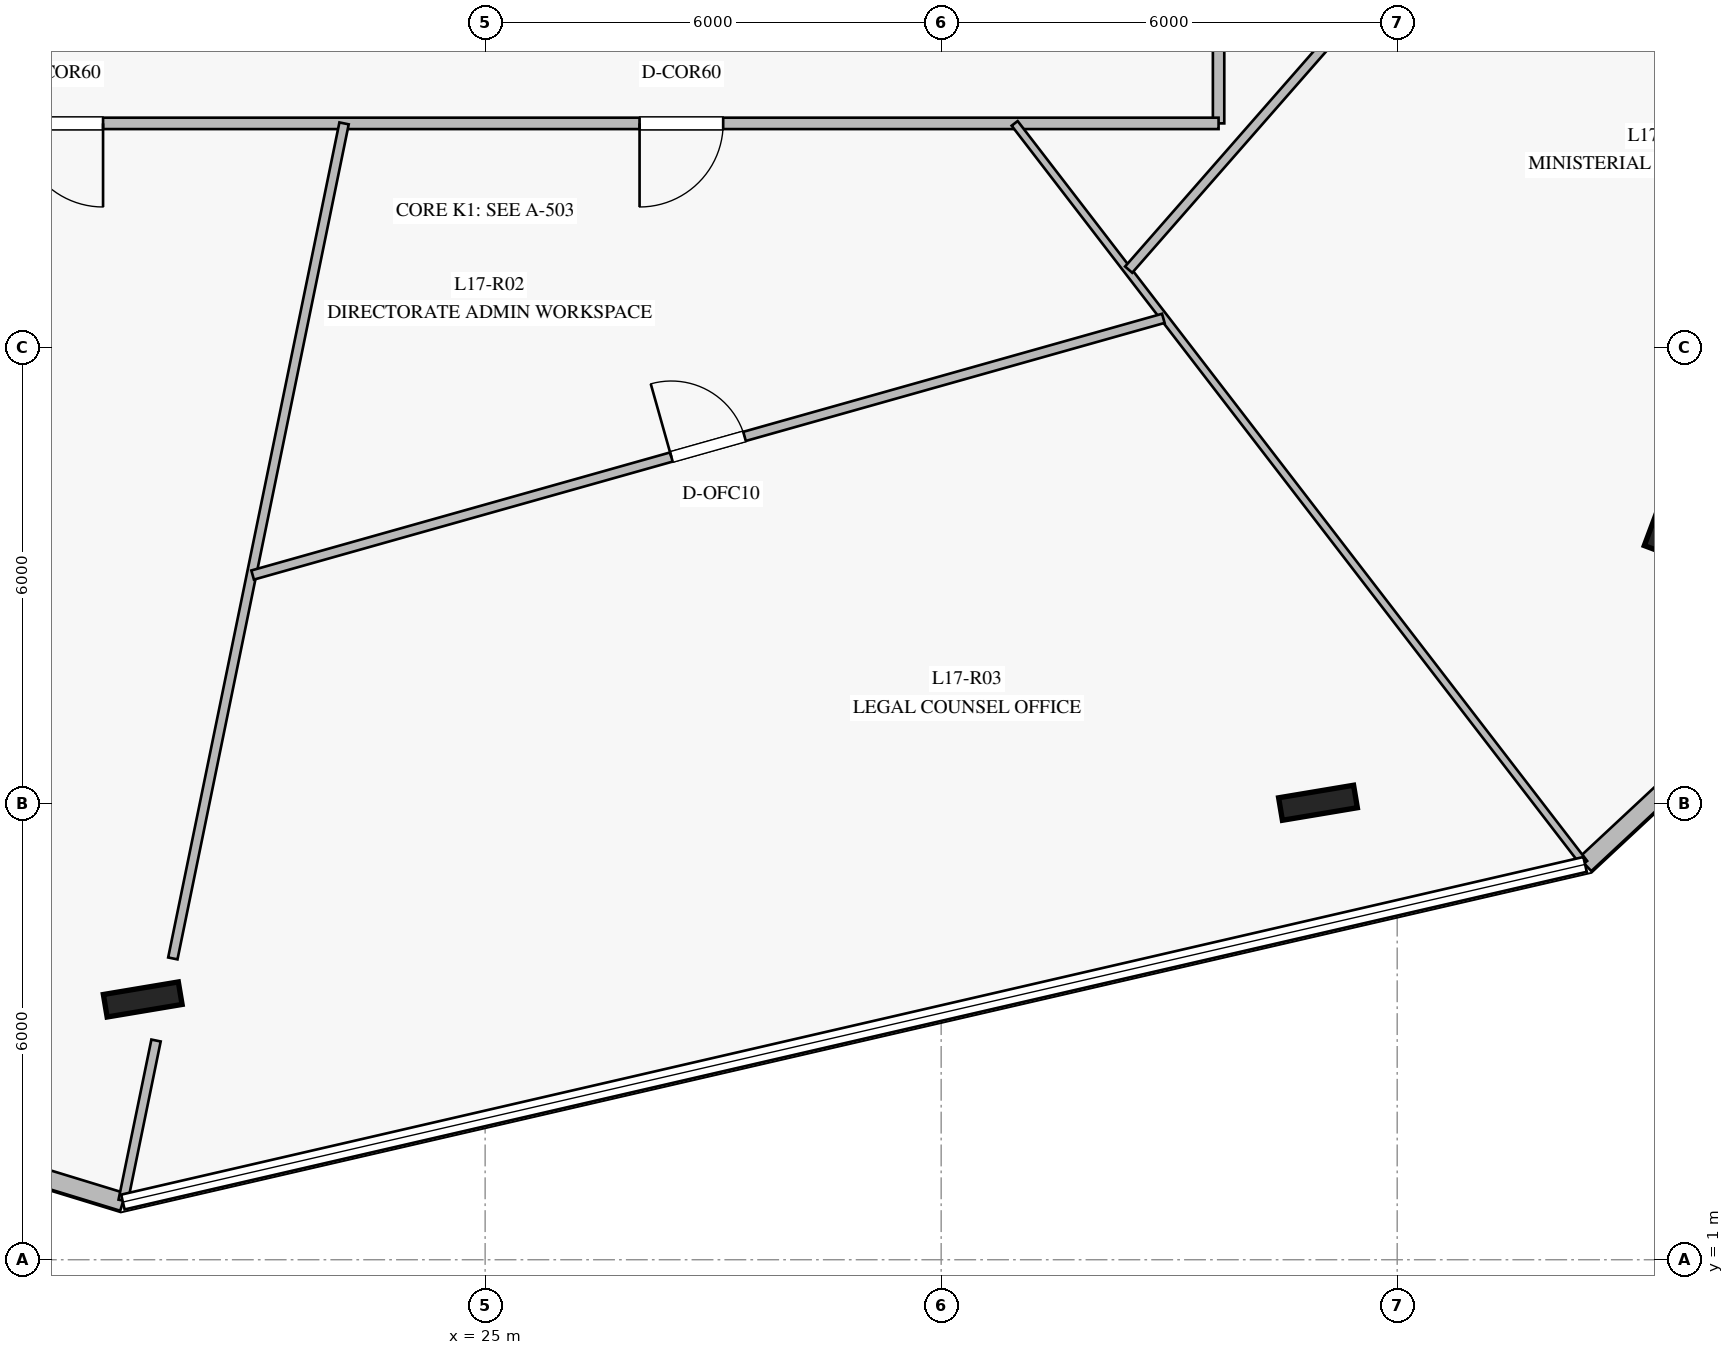
"""IFC4 building model, lengths in metres.
Left out: names, types, materials, properties, quantities, classifications, styles, units other than length and angle.
Written with IfcOpenShell. Run it as: python <this file> out.ifc"""

import sys

from ifc_helpers import new_model, si_unit, direction, frame, frame_2d, origin, origin_2d, place, context, subcontext, project, spatial, rectangle, i_section, extrude, element, fill, save


model = new_model("IFC4")
c1 = context("Model", 3, precision=1e-05, world=origin(), true_north=direction((0.0, 1.0)))
c2 = subcontext(c1, "Body", "Model", "MODEL_VIEW")
j1 = project(units=[si_unit("LENGTHUNIT", "METRE"), si_unit("PLANEANGLEUNIT", "RADIAN")], contexts=[c1])
p1 = place(None, origin())
s1 = spatial("IfcSite", under=j1, at=p1, CompositionType="ELEMENT")
p2 = place(p1, origin())
s2 = spatial("IfcBuilding", under=s1, at=p2, CompositionType="ELEMENT")
p3 = place(p2, frame((0.0, 0.0, 72.0)))
s3 = spatial("IfcBuildingStorey", under=s2, at=p3, CompositionType="ELEMENT", Elevation=72.0)
for number, where, z_axis, x_axis in (
    (1, (20.495, 4.424, 0.0), (0.0, 0.0, 1.0), (0.986, 0.165, 0.0)),
    (2, (35.958, 7.012, 0.0), (0.0, 0.0, 1.0), (0.986, 0.165, 0.0)),
    (3, (40.567, 10.811, 0.0), (0.0, 0.0, 1.0), (0.35, 0.937, 0.0)),
):
    element("IfcColumn", number, at=place(p3, frame(where, z_axis=z_axis, x_axis=x_axis)), inside=s3, PredefinedType="COLUMN", context=c2, shape_type="SweptSolid", body=[
        extrude(i_section(OverallWidth=0.3, OverallDepth=1.0, WebThickness=0.019, FlangeThickness=0.036, at=origin_2d()), origin(), (0.0, 0.0, 1.0), 4.0),
    ])
p4 = place(p3, frame((15.955, 3.067, 0.0), z_axis=(0.0, 0.0, 1.0), x_axis=(0.956323609786, -0.292310029535, 0.0)))
e4 = element("IfcWall", 4, at=p4, inside=s3, PredefinedType="STANDARD", context=c2, shape_type="SweptSolid", body=[
    extrude(rectangle(XDim=4.474, YDim=0.24, at=frame_2d((2.237, 0.0))), origin(), (0.0, 0.0, 1.0), 3.76),
])
p5 = place(p3, frame((39.472, 6.201, 0.0), z_axis=(0.0, 0.0, 1.0), x_axis=(0.731267590606, 0.682090691133, 0.0)))
e5 = element("IfcWall", 5, at=p5, inside=s3, PredefinedType="STANDARD", context=c2, shape_type="SweptSolid", body=[
    extrude(rectangle(XDim=4.473, YDim=0.24, at=frame_2d((2.237, 0.0))), origin(), (0.0, 0.0, 1.0), 3.76),
])
p6 = place(p3, frame((34.65, 34.05, 0.0), z_axis=(0.0, 0.0, 1.0), x_axis=(0.0, -1.0, 0.0)))
e6 = element("IfcWall", 6, at=p6, inside=s3, PredefinedType="PARTITIONING", context=c2, shape_type="SweptSolid", body=[
    extrude(rectangle(XDim=18.1, YDim=0.15, at=frame_2d((9.05, 0.0))), origin(), (0.0, 0.0, 1.0), 3.21),
])
p7 = place(p6, frame((13.102, 0.0, 0.0)))
e7 = element("IfcOpeningElement", 7, at=p7, cuts=e6, PredefinedType="OPENING", context=c2, shape_type="SweptSolid", body=[
    extrude(rectangle(XDim=1.1, YDim=2.2, at=frame_2d((0.55, 1.1))), frame((0.0, 0.085, 0.0), z_axis=(0.0, -1.0, 0.0), x_axis=(1.0, 0.0, 0.0)), (0.0, 0.0, 1.0), 0.17),
])
p8 = place(p3, frame((34.65, 15.95, 0.0), z_axis=(0.0, 0.0, 1.0), x_axis=(-1.0, 0.0, 0.0)))
e8 = element("IfcWall", 8, at=p8, inside=s3, PredefinedType="PARTITIONING", context=c2, shape_type="SweptSolid", body=[
    extrude(rectangle(XDim=19.3, YDim=0.15, at=frame_2d((9.65, 0.0))), origin(), (0.0, 0.0, 1.0), 3.21),
])
p9 = place(p8, frame((14.677, 0.0, 0.0)))
e9 = element("IfcOpeningElement", 9, at=p9, cuts=e8, PredefinedType="OPENING", context=c2, shape_type="SweptSolid", body=[
    extrude(rectangle(XDim=1.1, YDim=2.2, at=frame_2d((0.55, 1.1))), frame((0.0, 0.085, 0.0), z_axis=(0.0, -1.0, 0.0), x_axis=(1.0, 0.0, 0.0)), (0.0, 0.0, 1.0), 0.17),
])
p10 = place(p8, frame((6.518, 0.0, 0.0)))
e10 = element("IfcOpeningElement", 10, at=p10, cuts=e8, PredefinedType="OPENING", context=c2, shape_type="SweptSolid", body=[
    extrude(rectangle(XDim=1.1, YDim=2.2, at=frame_2d((0.55, 1.1))), frame((0.0, 0.085, 0.0), z_axis=(0.0, -1.0, 0.0), x_axis=(1.0, 0.0, 0.0)), (0.0, 0.0, 1.0), 0.17),
])
p11 = place(p3, frame((23.144, 15.95, 0.0), z_axis=(0.0, 0.0, 1.0), x_axis=(-0.200894861911, -0.979612808439, 0.0)))
e11 = element("IfcWall", 11, at=p11, inside=s3, PredefinedType="PARTITIONING", context=c2, shape_type="SweptSolid", body=[
    extrude(rectangle(XDim=11.214, YDim=0.125, at=frame_2d((5.607, 0.0))), origin(), (0.0, 0.0, 1.0), 3.76),
])
p12 = place(p3, frame((20.67, 3.884, 0.0), z_axis=(0.0, 0.0, 1.0), x_axis=(-0.200896639603, -0.979612443876, 0.0)))
e12 = element("IfcWall", 12, at=p12, inside=s3, PredefinedType="PARTITIONING", context=c2, shape_type="SweptSolid", body=[
    extrude(rectangle(XDim=2.15, YDim=0.125, at=frame_2d((1.075, 0.0))), origin(), (0.0, 0.0, 1.0), 3.76),
])
p13 = place(p3, frame((31.967, 15.95, 0.0), z_axis=(0.0, 0.0, 1.0), x_axis=(0.609982546542, -0.792414848999, 0.0)))
e13 = element("IfcWall", 13, at=p13, inside=s3, PredefinedType="MOVABLE", context=c2, shape_type="SweptSolid", body=[
    extrude(rectangle(XDim=12.284, YDim=0.1, at=frame_2d((6.142, 0.0))), origin(), (0.0, 0.0, 1.0), 3.06),
])
p14 = place(p3, frame((21.941, 10.008, 0.0), z_axis=(0.0, 0.0, 1.0), x_axis=(0.962504966676, 0.271264057928, 0.0)))
e14 = element("IfcWall", 14, at=p14, inside=s3, PredefinedType="PARTITIONING", context=c2, shape_type="SweptSolid", body=[
    extrude(rectangle(XDim=12.449, YDim=0.125, at=frame_2d((6.225, 0.0))), origin(), (0.0, 0.0, 1.0), 3.21),
])
p15 = place(p14, frame((5.724, 0.0, 0.0)))
e15 = element("IfcOpeningElement", 15, at=p15, cuts=e14, PredefinedType="OPENING", context=c2, shape_type="SweptSolid", body=[
    extrude(rectangle(XDim=1.0, YDim=2.15, at=frame_2d((0.5, 1.075))), frame((0.0, 0.073, 0.0), z_axis=(0.0, -1.0, 0.0), x_axis=(1.0, 0.0, 0.0)), (0.0, 0.0, 1.0), 0.145),
])
p16 = place(p3, frame((33.467, 14.026, 0.0), z_axis=(0.0, 0.0, 1.0), x_axis=(0.65898913026, 0.752152462071, 0.0)))
e16 = element("IfcWall", 16, at=p16, inside=s3, PredefinedType="PARTITIONING", context=c2, shape_type="SweptSolid", body=[
    extrude(rectangle(XDim=12.946, YDim=0.125, at=frame_2d((6.473, 0.0))), origin(), (0.0, 0.0, 1.0), 3.05),
])
p17 = place(p16, frame((5.883, 0.0, 0.0)))
e17 = element("IfcOpeningElement", 17, at=p17, cuts=e16, PredefinedType="OPENING", context=c2, shape_type="SweptSolid", body=[
    extrude(rectangle(XDim=1.0, YDim=2.15, at=frame_2d((0.5, 1.075))), frame((0.0, 0.073, 0.0), z_axis=(0.0, -1.0, 0.0), x_axis=(1.0, 0.0, 0.0)), (0.0, 0.0, 1.0), 0.145),
])
p18 = place(p9, origin())
e18 = element("IfcDoor", 18, at=p18, inside=s3, OperationType="SINGLE_SWING_LEFT", PredefinedType="DOOR", context=c2, shape_type="SweptSolid", body=[
    extrude(rectangle(XDim=1.1, YDim=2.2, at=frame_2d((0.55, 1.1))), frame((0.0, 0.025, 0.0), z_axis=(0.0, -1.0, 0.0), x_axis=(1.0, 0.0, 0.0)), (0.0, 0.0, 1.0), 0.05),
])
fill(e9, e18)
p19 = place(p10, origin())
e19 = element("IfcDoor", 19, at=p19, inside=s3, OperationType="SINGLE_SWING_RIGHT", PredefinedType="DOOR", context=c2, shape_type="SweptSolid", body=[
    extrude(rectangle(XDim=1.1, YDim=2.2, at=frame_2d((0.55, 1.1))), frame((0.0, 0.025, 0.0), z_axis=(0.0, -1.0, 0.0), x_axis=(1.0, 0.0, 0.0)), (0.0, 0.0, 1.0), 0.05),
])
fill(e10, e19)
p20 = place(p15, origin())
e20 = element("IfcDoor", 20, at=p20, inside=s3, OperationType="SINGLE_SWING_LEFT", PredefinedType="DOOR", context=c2, shape_type="SweptSolid", body=[
    extrude(rectangle(XDim=1.0, YDim=2.15, at=frame_2d((0.5, 1.075))), frame((0.0, 0.025, 0.0), z_axis=(0.0, -1.0, 0.0), x_axis=(1.0, 0.0, 0.0)), (0.0, 0.0, 1.0), 0.05),
])
fill(e15, e20)
save(model, sys.argv[1])
